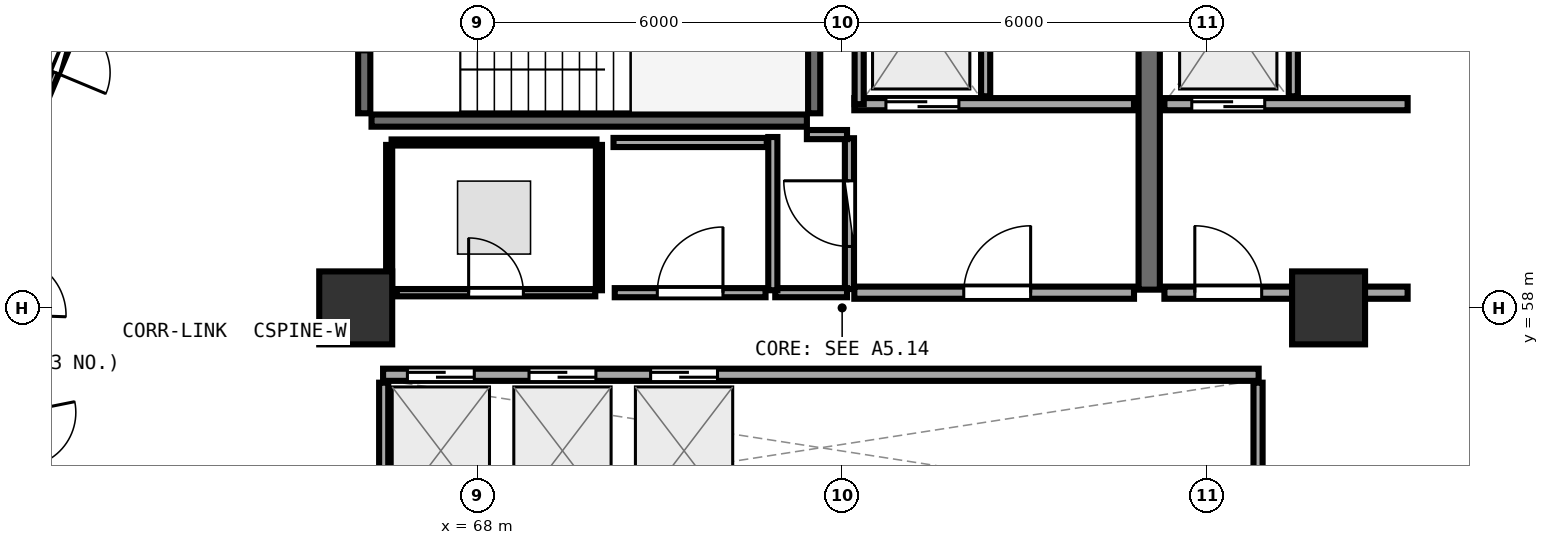
"""IFC4 building model, lengths in metres.
Left out: names, types, materials, properties, quantities, classifications, styles, units other than length and angle.
Written with IfcOpenShell. Run it as: python <this file> out.ifc"""

import sys

from ifc_helpers import new_model, si_unit, direction, frame, frame_2d, origin, origin_2d, place, context, subcontext, project, spatial, rectangle, extrude, element, fill, save


model = new_model("IFC4")
c1 = context("Model", 3, precision=1e-05, world=origin(), true_north=direction((0.0, 1.0)))
c2 = subcontext(c1, "Body", "Model", "MODEL_VIEW")
j1 = project(units=[si_unit("LENGTHUNIT", "METRE"), si_unit("PLANEANGLEUNIT", "RADIAN")], contexts=[c1])
p1 = place(None, origin())
s1 = spatial("IfcSite", under=j1, at=p1, CompositionType="ELEMENT")
p2 = place(p1, origin())
s2 = spatial("IfcBuilding", under=s1, at=p2, CompositionType="ELEMENT")
p3 = place(p2, frame((0.0, 0.0, 196.95)))
s3 = spatial("IfcBuildingStorey", under=s2, at=p3, CompositionType="ELEMENT", Elevation=196.95)
for number, where, z_axis, x_axis in (
    (1, (82.0, 58.0, 0.0), (0.0, 0.0, 1.0), (1.0, 0.0, 0.0)),
    (2, (66.0, 58.0, 0.0), (0.0, 0.0, 1.0), (1.0, 0.0, 0.0)),
):
    element("IfcColumn", number, at=place(p3, frame(where, z_axis=z_axis, x_axis=x_axis)), inside=s3, PredefinedType="PILASTER", context=c2, shape_type="SweptSolid", body=[
        extrude(rectangle(XDim=1.2, YDim=1.2, at=origin_2d()), origin(), (0.0, 0.0, 1.0), 3.75),
    ])
p4 = place(p3, frame((66.26, 61.08, 0.0), z_axis=(0.0, 0.0, 1.0), x_axis=(1.0, 0.0, 0.0)))
e3 = element("IfcWall", 3, at=p4, inside=s3, PredefinedType="SHEAR", context=c2, shape_type="SweptSolid", body=[
    extrude(rectangle(XDim=7.16, YDim=0.2, at=frame_2d((3.58, 0.0))), origin(), (0.0, 0.0, 1.0), 3.49),
])
p5 = place(p3, frame((73.54, 61.2, 0.0), z_axis=(0.0, 0.0, 1.0), x_axis=(0.0, 1.0, 0.0)))
e4 = element("IfcWall", 4, at=p5, inside=s3, PredefinedType="SHEAR", context=c2, shape_type="SweptSolid", body=[
    extrude(rectangle(XDim=3.07, YDim=0.2, at=frame_2d((1.535, 0.0))), origin(), (0.0, 0.0, 1.0), 3.49),
])
p6 = place(p3, frame((66.14, 64.27, 0.0), z_axis=(0.0, 0.0, 1.0), x_axis=(0.0, -1.0, 0.0)))
e5 = element("IfcWall", 5, at=p6, inside=s3, PredefinedType="SHEAR", context=c2, shape_type="SweptSolid", body=[
    extrude(rectangle(XDim=3.07, YDim=0.2, at=frame_2d((1.535, 0.0))), origin(), (0.0, 0.0, 1.0), 3.49),
])
p7 = place(p6, frame((1.01, 0.0, 0.0)))
e6 = element("IfcOpeningElement", 6, at=p7, cuts=e5, PredefinedType="OPENING", context=c2, shape_type="SweptSolid", body=[
    extrude(rectangle(XDim=1.05, YDim=2.1, at=frame_2d((0.525, 1.05))), frame((0.0, 0.11, 0.0), z_axis=(0.0, -1.0, 0.0), x_axis=(1.0, 0.0, 0.0)), (0.0, 0.0, 1.0), 0.22),
])
p8 = place(p3, frame((79.05, 58.3, 0.0), z_axis=(0.0, 0.0, 1.0), x_axis=(0.0, 1.0, 0.0)))
e7 = element("IfcWall", 7, at=p8, inside=s3, PredefinedType="SHEAR", context=c2, shape_type="SweptSolid", body=[
    extrude(rectangle(XDim=6.3, YDim=0.35, at=frame_2d((3.15, 0.0))), origin(), (0.0, 0.0, 1.0), 3.49),
])
p9 = place(p3, frame((74.2, 61.35, 0.0), z_axis=(0.0, 0.0, 1.0), x_axis=(1.0, 0.0, 0.0)))
e8 = element("IfcWall", 8, at=p9, inside=s3, PredefinedType="SOLIDWALL", context=c2, shape_type="SweptSolid", body=[
    extrude(rectangle(XDim=4.6, YDim=0.2, at=frame_2d((2.3, 0.0))), origin(), (0.0, 0.0, 1.0), 3.48),
])
p10 = place(p9, frame((0.52, 0.0, 0.0)))
e9 = element("IfcOpeningElement", 9, at=p10, cuts=e8, PredefinedType="OPENING", context=c2, shape_type="SweptSolid", body=[
    extrude(rectangle(XDim=1.2, YDim=2.15, at=frame_2d((0.6, 1.075))), frame((0.0, 0.11, 0.0), z_axis=(0.0, -1.0, 0.0), x_axis=(1.0, 0.0, 0.0)), (0.0, 0.0, 1.0), 0.22),
])
p11 = place(p3, frame((74.28, 61.35, 0.0), z_axis=(0.0, 0.0, 1.0), x_axis=(0.0, 1.0, 0.0)))
e10 = element("IfcWall", 10, at=p11, inside=s3, PredefinedType="PARTITIONING", context=c2, shape_type="SweptSolid", body=[
    extrude(rectangle(XDim=2.97, YDim=0.15, at=frame_2d((1.485, 0.0))), origin(), (0.0, 0.0, 1.0), 3.48),
])
p12 = place(p3, frame((76.36, 61.48, 0.0), z_axis=(0.0, 0.0, 1.0), x_axis=(0.0, 1.0, 0.0)))
e11 = element("IfcWall", 11, at=p12, inside=s3, PredefinedType="PARTITIONING", context=c2, shape_type="SweptSolid", body=[
    extrude(rectangle(XDim=2.84, YDim=0.15, at=frame_2d((1.42, 0.0))), origin(), (0.0, 0.0, 1.0), 3.48),
])
p13 = place(p3, frame((79.3, 61.35, 0.0), z_axis=(0.0, 0.0, 1.0), x_axis=(1.0, 0.0, 0.0)))
e12 = element("IfcWall", 12, at=p13, inside=s3, PredefinedType="SOLIDWALL", context=c2, shape_type="SweptSolid", body=[
    extrude(rectangle(XDim=4.0, YDim=0.2, at=frame_2d((2.0, 0.0))), origin(), (0.0, 0.0, 1.0), 2.775),
])
p14 = place(p13, frame((0.45, 0.0, 0.0)))
e13 = element("IfcOpeningElement", 13, at=p14, cuts=e12, PredefinedType="OPENING", context=c2, shape_type="SweptSolid", body=[
    extrude(rectangle(XDim=1.2, YDim=2.15, at=frame_2d((0.6, 1.075))), frame((0.0, 0.11, 0.0), z_axis=(0.0, -1.0, 0.0), x_axis=(1.0, 0.0, 0.0)), (0.0, 0.0, 1.0), 0.22),
])
p15 = place(p3, frame((81.42, 61.48, 0.0), z_axis=(0.0, 0.0, 1.0), x_axis=(0.0, 1.0, 0.0)))
e14 = element("IfcWall", 14, at=p15, inside=s3, PredefinedType="PARTITIONING", context=c2, shape_type="SweptSolid", body=[
    extrude(rectangle(XDim=2.84, YDim=0.15, at=frame_2d((1.42, 0.0))), origin(), (0.0, 0.0, 1.0), 3.48),
])
p16 = place(p3, frame((74.2, 58.25, 0.0), z_axis=(0.0, 0.0, 1.0), x_axis=(1.0, 0.0, 0.0)))
e15 = element("IfcWall", 15, at=p16, inside=s3, PredefinedType="SOLIDWALL", context=c2, shape_type="SweptSolid", body=[
    extrude(rectangle(XDim=4.6, YDim=0.2, at=frame_2d((2.3, 0.0))), origin(), (0.0, 0.0, 1.0), 3.48),
])
p17 = place(p16, frame((1.8, 0.0, 0.0)))
e16 = element("IfcOpeningElement", 16, at=p17, cuts=e15, PredefinedType="OPENING", context=c2, shape_type="SweptSolid", body=[
    extrude(rectangle(XDim=1.1, YDim=2.1, at=frame_2d((0.55, 1.05))), frame((0.0, 0.11, 0.0), z_axis=(0.0, -1.0, 0.0), x_axis=(1.0, 0.0, 0.0)), (0.0, 0.0, 1.0), 0.22),
])
p18 = place(p3, frame((79.3, 58.25, 0.0), z_axis=(0.0, 0.0, 1.0), x_axis=(1.0, 0.0, 0.0)))
e17 = element("IfcWall", 17, at=p18, inside=s3, PredefinedType="SOLIDWALL", context=c2, shape_type="SweptSolid", body=[
    extrude(rectangle(XDim=4.0, YDim=0.2, at=frame_2d((2.0, 0.0))), origin(), (0.0, 0.0, 1.0), 2.775),
])
p19 = place(p18, frame((0.5, 0.0, 0.0)))
e18 = element("IfcOpeningElement", 18, at=p19, cuts=e17, PredefinedType="OPENING", context=c2, shape_type="SweptSolid", body=[
    extrude(rectangle(XDim=1.1, YDim=2.1, at=frame_2d((0.55, 1.05))), frame((0.0, 0.11, 0.0), z_axis=(0.0, -1.0, 0.0), x_axis=(1.0, 0.0, 0.0)), (0.0, 0.0, 1.0), 0.22),
])
p20 = place(p3, frame((66.45, 56.9, 0.0), z_axis=(0.0, 0.0, 1.0), x_axis=(1.0, 0.0, 0.0)))
e19 = element("IfcWall", 19, at=p20, inside=s3, PredefinedType="SOLIDWALL", context=c2, shape_type="SweptSolid", body=[
    extrude(rectangle(XDim=14.4, YDim=0.2, at=frame_2d((7.2, 0.0))), origin(), (0.0, 0.0, 1.0), 3.48),
])
p21 = place(p20, frame((0.4, 0.0, 0.0)))
e20 = element("IfcOpeningElement", 20, at=p21, cuts=e19, PredefinedType="OPENING", context=c2, shape_type="SweptSolid", body=[
    extrude(rectangle(XDim=1.1, YDim=2.1, at=frame_2d((0.55, 1.05))), frame((0.0, 0.11, 0.0), z_axis=(0.0, -1.0, 0.0), x_axis=(1.0, 0.0, 0.0)), (0.0, 0.0, 1.0), 0.22),
])
p22 = place(p20, frame((2.4, 0.0, 0.0)))
e21 = element("IfcOpeningElement", 21, at=p22, cuts=e19, PredefinedType="OPENING", context=c2, shape_type="SweptSolid", body=[
    extrude(rectangle(XDim=1.1, YDim=2.1, at=frame_2d((0.55, 1.05))), frame((0.0, 0.11, 0.0), z_axis=(0.0, -1.0, 0.0), x_axis=(1.0, 0.0, 0.0)), (0.0, 0.0, 1.0), 0.22),
])
p23 = place(p20, frame((4.4, 0.0, 0.0)))
e22 = element("IfcOpeningElement", 22, at=p23, cuts=e19, PredefinedType="OPENING", context=c2, shape_type="SweptSolid", body=[
    extrude(rectangle(XDim=1.1, YDim=2.1, at=frame_2d((0.55, 1.05))), frame((0.0, 0.11, 0.0), z_axis=(0.0, -1.0, 0.0), x_axis=(1.0, 0.0, 0.0)), (0.0, 0.0, 1.0), 0.22),
])
for number, where, z_axis, x_axis in (
    (23, (66.46, 54.48, 0.0), (0.0, 0.0, 1.0), (0.0, 1.0, 0.0)),
    (24, (80.84, 54.48, 0.0), (0.0, 0.0, 1.0), (0.0, 1.0, 0.0)),
):
    element("IfcWall", number, at=place(p3, frame(where, z_axis=z_axis, x_axis=x_axis)), inside=s3, PredefinedType="PARTITIONING", context=c2, shape_type="SweptSolid", body=[
        extrude(rectangle(XDim=2.29, YDim=0.15, at=frame_2d((1.145, 0.0))), origin(), (0.0, 0.0, 1.0), 3.48),
    ])
p24 = place(p3, frame((74.12, 58.31, 0.0), z_axis=(0.0, 0.0, 1.0), x_axis=(0.0, 1.0, 0.0)))
e25 = element("IfcWall", 25, at=p24, inside=s3, PredefinedType="PARTITIONING", context=c2, shape_type="SweptSolid", body=[
    extrude(rectangle(XDim=2.48, YDim=0.15, at=frame_2d((1.24, 0.0))), origin(), (0.0, 0.0, 1.0), 3.48),
])
p25 = place(p24, frame((0.7, 0.0, 0.0)))
e26 = element("IfcOpeningElement", 26, at=p25, cuts=e25, PredefinedType="OPENING", context=c2, shape_type="SweptSolid", body=[
    extrude(rectangle(XDim=1.08, YDim=2.1, at=frame_2d((0.54, 1.05))), frame((0.0, 0.085, 0.0), z_axis=(0.0, -1.0, 0.0), x_axis=(1.0, 0.0, 0.0)), (0.0, 0.0, 1.0), 0.17),
])
p26 = place(p3, frame((66.675, 58.25, 0.0), z_axis=(0.0, 0.0, 1.0), x_axis=(1.0, 0.0, 0.0)))
e27 = element("IfcWall", 27, at=p26, inside=s3, PredefinedType="PARTITIONING", context=c2, shape_type="SweptSolid", body=[
    extrude(rectangle(XDim=3.265, YDim=0.12, at=frame_2d((1.632, 0.0))), origin(), (0.0, 0.0, 1.0), 3.48),
])
p27 = place(p26, frame((1.182, 0.0, 0.0)))
e28 = element("IfcOpeningElement", 28, at=p27, cuts=e27, PredefinedType="OPENING", context=c2, shape_type="SweptSolid", body=[
    extrude(rectangle(XDim=0.9, YDim=2.08, at=frame_2d((0.45, 1.04))), frame((0.0, 0.07, 0.0), z_axis=(0.0, -1.0, 0.0), x_axis=(1.0, 0.0, 0.0)), (0.0, 0.0, 1.0), 0.14),
])
p28 = place(p3, frame((70.26, 58.25, 0.0), z_axis=(0.0, 0.0, 1.0), x_axis=(1.0, 0.0, 0.0)))
e29 = element("IfcWall", 29, at=p28, inside=s3, PredefinedType="PARTITIONING", context=c2, shape_type="SweptSolid", body=[
    extrude(rectangle(XDim=2.48, YDim=0.15, at=frame_2d((1.24, 0.0))), origin(), (0.0, 0.0, 1.0), 3.48),
])
p29 = place(p28, frame((0.7, 0.0, 0.0)))
e30 = element("IfcOpeningElement", 30, at=p29, cuts=e29, PredefinedType="OPENING", context=c2, shape_type="SweptSolid", body=[
    extrude(rectangle(XDim=1.08, YDim=2.1, at=frame_2d((0.54, 1.05))), frame((0.0, 0.085, 0.0), z_axis=(0.0, -1.0, 0.0), x_axis=(1.0, 0.0, 0.0)), (0.0, 0.0, 1.0), 0.17),
])
p30 = place(p3, frame((61.793, 63.629, 0.0), z_axis=(0.0, 0.0, 1.0), x_axis=(-0.384145151494, -0.923272713007, 0.0)))
e31 = element("IfcWall", 31, at=p30, inside=s3, PredefinedType="PARTITIONING", context=c2, shape_type="SweptSolid", body=[
    extrude(rectangle(XDim=2.913, YDim=0.12, at=frame_2d((1.456, 0.0))), origin(), (0.0, 0.0, 1.0), 3.235),
])
p31 = place(p30, frame((1.006, 0.0, 0.0)))
e32 = element("IfcOpeningElement", 32, at=p31, cuts=e31, PredefinedType="OPENING", context=c2, shape_type="SweptSolid", body=[
    extrude(rectangle(XDim=0.9, YDim=2.08, at=frame_2d((0.45, 1.04))), frame((0.0, 0.07, 0.0), z_axis=(0.0, -1.0, 0.0), x_axis=(1.0, 0.0, 0.0)), (0.0, 0.0, 1.0), 0.14),
])
p32 = place(p3, frame((72.9, 58.25, 0.0), z_axis=(0.0, 0.0, 1.0), x_axis=(1.0, 0.0, 0.0)))
e33 = element("IfcWall", 33, at=p32, inside=s3, PredefinedType="PARTITIONING", context=c2, shape_type="SweptSolid", body=[
    extrude(rectangle(XDim=1.18, YDim=0.15, at=frame_2d((0.59, 0.0))), origin(), (0.0, 0.0, 1.0), 3.48),
])
p33 = place(p3, frame((74.08, 60.85, 0.0), z_axis=(0.0, 0.0, 1.0), x_axis=(-1.0, 0.0, 0.0)))
e34 = element("IfcWall", 34, at=p33, inside=s3, PredefinedType="PARTITIONING", context=c2, shape_type="SweptSolid", body=[
    extrude(rectangle(XDim=0.66, YDim=0.15, at=frame_2d((0.33, 0.0))), origin(), (0.0, 0.0, 1.0), 3.48),
])
p34 = place(p3, frame((72.86, 60.81, 0.0), z_axis=(0.0, 0.0, 1.0), x_axis=(0.0, -1.0, 0.0)))
e35 = element("IfcWall", 35, at=p34, inside=s3, PredefinedType="PARTITIONING", context=c2, shape_type="SweptSolid", body=[
    extrude(rectangle(XDim=2.52, YDim=0.15, at=frame_2d((1.26, 0.0))), origin(), (0.0, 0.0, 1.0), 3.48),
])
p35 = place(p3, frame((70.0, 58.29, 0.0), z_axis=(0.0, 0.0, 1.0), x_axis=(0.0, 1.0, 0.0)))
e36 = element("IfcWall", 36, at=p35, inside=s3, PredefinedType="PARTITIONING", context=c2, shape_type="SweptSolid", body=[
    extrude(rectangle(XDim=2.39, YDim=0.1, at=frame_2d((1.195, 0.0))), origin(), (0.0, 0.0, 1.0), 3.48),
])
p36 = place(p3, frame((69.96, 60.72, 0.0), z_axis=(0.0, 0.0, 1.0), x_axis=(-1.0, 0.0, 0.0)))
e37 = element("IfcWall", 37, at=p36, inside=s3, PredefinedType="PARTITIONING", context=c2, shape_type="SweptSolid", body=[
    extrude(rectangle(XDim=3.37, YDim=0.1, at=frame_2d((1.685, 0.0))), origin(), (0.0, 0.0, 1.0), 3.48),
])
p37 = place(p3, frame((66.55, 60.68, 0.0), z_axis=(0.0, 0.0, 1.0), x_axis=(0.0, -1.0, 0.0)))
e38 = element("IfcWall", 38, at=p37, inside=s3, PredefinedType="PARTITIONING", context=c2, shape_type="SweptSolid", body=[
    extrude(rectangle(XDim=2.383, YDim=0.1, at=frame_2d((1.191, 0.0))), origin(), (0.0, 0.0, 1.0), 3.48),
])
p38 = place(p3, frame((72.76, 60.72, 0.0), z_axis=(0.0, 0.0, 1.0), x_axis=(-1.0, 0.0, 0.0)))
e39 = element("IfcWall", 39, at=p38, inside=s3, PredefinedType="PARTITIONING", context=c2, shape_type="SweptSolid", body=[
    extrude(rectangle(XDim=2.52, YDim=0.15, at=frame_2d((1.26, 0.0))), origin(), (0.0, 0.0, 1.0), 3.48),
])
p39 = place(p10, origin())
e40 = element("IfcDoor", 40, at=p39, inside=s3, OperationType="DOUBLE_DOOR_SLIDING", PredefinedType="DOOR", context=c2, shape_type="SweptSolid", body=[
    extrude(rectangle(XDim=1.2, YDim=2.15, at=frame_2d((0.6, 1.075))), frame((0.0, 0.025, 0.0), z_axis=(0.0, -1.0, 0.0), x_axis=(1.0, 0.0, 0.0)), (0.0, 0.0, 1.0), 0.05),
])
fill(e9, e40)
p40 = place(p14, origin())
e41 = element("IfcDoor", 41, at=p40, inside=s3, OperationType="DOUBLE_DOOR_SLIDING", PredefinedType="DOOR", context=c2, shape_type="SweptSolid", body=[
    extrude(rectangle(XDim=1.2, YDim=2.15, at=frame_2d((0.6, 1.075))), frame((0.0, 0.025, 0.0), z_axis=(0.0, -1.0, 0.0), x_axis=(1.0, 0.0, 0.0)), (0.0, 0.0, 1.0), 0.05),
])
fill(e13, e41)
p41 = place(p17, frame((1.1, 0.0, 0.0), z_axis=(0.0, 0.0, 1.0), x_axis=(-1.0, 0.0, 0.0)))
e42 = element("IfcDoor", 42, at=p41, inside=s3, OperationType="SINGLE_SWING_LEFT", PredefinedType="DOOR", context=c2, shape_type="SweptSolid", body=[
    extrude(rectangle(XDim=1.1, YDim=2.1, at=frame_2d((0.55, 1.05))), frame((0.0, 0.025, 0.0), z_axis=(0.0, -1.0, 0.0), x_axis=(1.0, 0.0, 0.0)), (0.0, 0.0, 1.0), 0.05),
])
fill(e16, e42)
p42 = place(p19, frame((1.1, 0.0, 0.0), z_axis=(0.0, 0.0, 1.0), x_axis=(-1.0, 0.0, 0.0)))
e43 = element("IfcDoor", 43, at=p42, inside=s3, OperationType="SINGLE_SWING_RIGHT", PredefinedType="DOOR", context=c2, shape_type="SweptSolid", body=[
    extrude(rectangle(XDim=1.1, YDim=2.1, at=frame_2d((0.55, 1.05))), frame((0.0, 0.025, 0.0), z_axis=(0.0, -1.0, 0.0), x_axis=(1.0, 0.0, 0.0)), (0.0, 0.0, 1.0), 0.05),
])
fill(e18, e43)
p43 = place(p21, origin())
e44 = element("IfcDoor", 44, at=p43, inside=s3, OperationType="DOUBLE_DOOR_SLIDING", PredefinedType="DOOR", context=c2, shape_type="SweptSolid", body=[
    extrude(rectangle(XDim=1.1, YDim=2.1, at=frame_2d((0.55, 1.05))), frame((0.0, 0.025, 0.0), z_axis=(0.0, -1.0, 0.0), x_axis=(1.0, 0.0, 0.0)), (0.0, 0.0, 1.0), 0.05),
])
fill(e20, e44)
p44 = place(p22, origin())
e45 = element("IfcDoor", 45, at=p44, inside=s3, OperationType="DOUBLE_DOOR_SLIDING", PredefinedType="DOOR", context=c2, shape_type="SweptSolid", body=[
    extrude(rectangle(XDim=1.1, YDim=2.1, at=frame_2d((0.55, 1.05))), frame((0.0, 0.025, 0.0), z_axis=(0.0, -1.0, 0.0), x_axis=(1.0, 0.0, 0.0)), (0.0, 0.0, 1.0), 0.05),
])
fill(e21, e45)
p45 = place(p23, origin())
e46 = element("IfcDoor", 46, at=p45, inside=s3, OperationType="DOUBLE_DOOR_SLIDING", PredefinedType="DOOR", context=c2, shape_type="SweptSolid", body=[
    extrude(rectangle(XDim=1.1, YDim=2.1, at=frame_2d((0.55, 1.05))), frame((0.0, 0.025, 0.0), z_axis=(0.0, -1.0, 0.0), x_axis=(1.0, 0.0, 0.0)), (0.0, 0.0, 1.0), 0.05),
])
fill(e22, e46)
p46 = place(p25, origin())
e47 = element("IfcDoor", 47, at=p46, inside=s3, OperationType="SINGLE_SWING_RIGHT", PredefinedType="DOOR", context=c2, shape_type="SweptSolid", body=[
    extrude(rectangle(XDim=1.08, YDim=2.1, at=frame_2d((0.54, 1.05))), frame((0.0, 0.025, 0.0), z_axis=(0.0, -1.0, 0.0), x_axis=(1.0, 0.0, 0.0)), (0.0, 0.0, 1.0), 0.05),
])
fill(e26, e47)
p47 = place(p27, origin())
e48 = element("IfcDoor", 48, at=p47, inside=s3, OperationType="SINGLE_SWING_LEFT", PredefinedType="DOOR", context=c2, shape_type="SweptSolid", body=[
    extrude(rectangle(XDim=0.9, YDim=2.08, at=frame_2d((0.45, 1.04))), frame((0.0, 0.025, 0.0), z_axis=(0.0, -1.0, 0.0), x_axis=(1.0, 0.0, 0.0)), (0.0, 0.0, 1.0), 0.05),
])
fill(e28, e48)
p48 = place(p29, origin())
e49 = element("IfcDoor", 49, at=p48, inside=s3, OperationType="SINGLE_SWING_RIGHT", PredefinedType="DOOR", context=c2, shape_type="SweptSolid", body=[
    extrude(rectangle(XDim=1.08, YDim=2.1, at=frame_2d((0.54, 1.05))), frame((0.0, 0.025, 0.0), z_axis=(0.0, -1.0, 0.0), x_axis=(1.0, 0.0, 0.0)), (0.0, 0.0, 1.0), 0.05),
])
fill(e30, e49)
p49 = place(p31, origin())
e50 = element("IfcDoor", 50, at=p49, inside=s3, OperationType="SINGLE_SWING_RIGHT", PredefinedType="DOOR", context=c2, shape_type="SweptSolid", body=[
    extrude(rectangle(XDim=0.9, YDim=2.08, at=frame_2d((0.45, 1.04))), frame((0.0, 0.025, 0.0), z_axis=(0.0, -1.0, 0.0), x_axis=(1.0, 0.0, 0.0)), (0.0, 0.0, 1.0), 0.05),
])
fill(e32, e50)
save(model, sys.argv[1])
